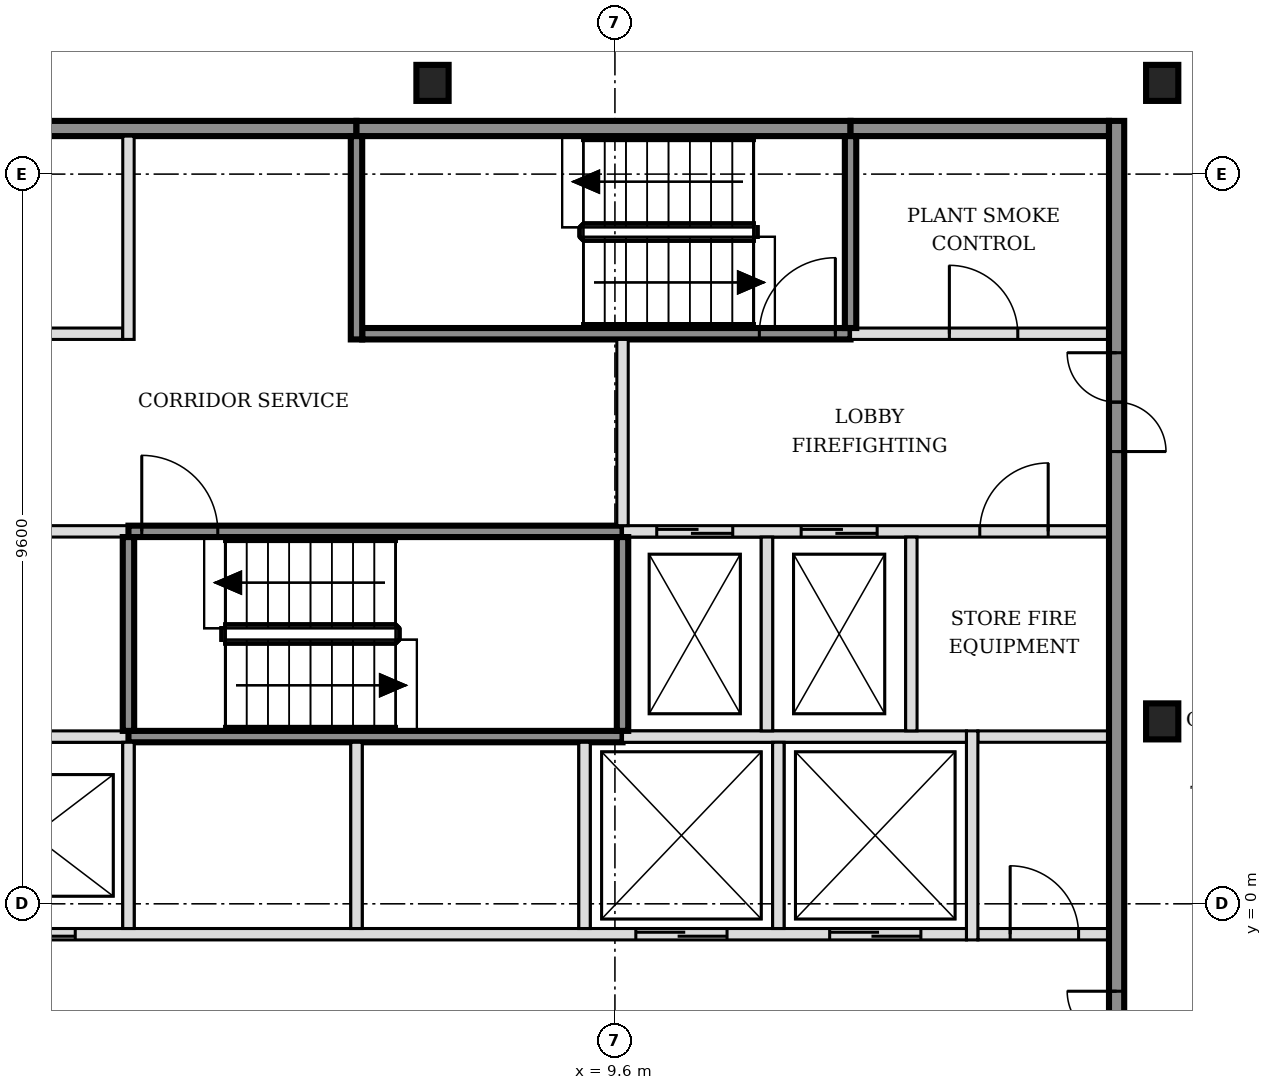
"""IFC4 building model, lengths in metres.
Left out: names, types, materials, properties, quantities, classifications, styles, units other than length and angle.
Written with IfcOpenShell. Run it as: python <this file> out.ifc"""

import sys

from ifc_helpers import new_model, si_unit, direction, frame, frame_2d, origin, origin_2d, place, context, subcontext, project, spatial, rectangle, i_section, extrude, element, fill, save


model = new_model("IFC4")
c1 = context("Model", 3, precision=1e-05, world=origin(), true_north=direction((0.0, 1.0)))
c2 = subcontext(c1, "Body", "Model", "MODEL_VIEW")
j1 = project(units=[si_unit("LENGTHUNIT", "METRE"), si_unit("PLANEANGLEUNIT", "RADIAN")], contexts=[c1])
p1 = place(None, origin())
s1 = spatial("IfcSite", under=j1, at=p1, CompositionType="ELEMENT")
p2 = place(p1, origin())
s2 = spatial("IfcBuilding", under=s1, at=p2, CompositionType="ELEMENT")
p3 = place(p2, frame((0.0, 0.0, 119.4)))
s3 = spatial("IfcBuildingStorey", under=s2, at=p3, CompositionType="ELEMENT", Elevation=119.4)
for number, where, z_axis, x_axis in (
    (1, (16.8, 2.4, -0.25), (0.0, 0.0, 1.0), (1.0, 0.0, 0.0)),
    (2, (7.2, 10.8, -0.25), (0.0, 0.0, 1.0), (1.0, 0.0, 0.0)),
    (3, (16.8, 10.8, -0.25), (0.0, 0.0, 1.0), (1.0, 0.0, 0.0)),
):
    element("IfcColumn", number, at=place(p3, frame(where, z_axis=z_axis, x_axis=x_axis)), inside=s3, PredefinedType="COLUMN", context=c2, shape_type="SweptSolid", body=[
        extrude(i_section(OverallWidth=0.424, OverallDepth=0.474, WebThickness=0.048, FlangeThickness=0.077, FilletRadius=0.015, at=origin_2d()), origin(), (0.0, 0.0, 1.0), 6.1),
    ])
p4 = place(p3, frame((-1.7, -0.4, 0.0), z_axis=(0.0, 0.0, 1.0), x_axis=(1.0, 0.0, 0.0)))
e4 = element("IfcWall", 4, at=p4, inside=s3, PredefinedType="SOLIDWALL", context=c2, shape_type="SweptSolid", body=[
    extrude(rectangle(XDim=15.925, YDim=0.15, at=frame_2d((7.962, 0.0))), origin(), (0.0, 0.0, 1.0), 5.85),
])
p5 = place(p4, frame((0.6, 0.0, 0.0)))
e5 = element("IfcOpeningElement", 5, at=p5, cuts=e4, PredefinedType="OPENING", context=c2, shape_type="SweptSolid", body=[
    extrude(rectangle(XDim=1.1, YDim=2.1, at=frame_2d((0.55, 1.05))), frame((0.0, 0.085, 0.0), z_axis=(0.0, -1.0, 0.0), x_axis=(1.0, 0.0, 0.0)), (0.0, 0.0, 1.0), 0.17),
])
p6 = place(p4, frame((3.1, 0.0, 0.0)))
e6 = element("IfcOpeningElement", 6, at=p6, cuts=e4, PredefinedType="OPENING", context=c2, shape_type="SweptSolid", body=[
    extrude(rectangle(XDim=1.1, YDim=2.1, at=frame_2d((0.55, 1.05))), frame((0.0, 0.085, 0.0), z_axis=(0.0, -1.0, 0.0), x_axis=(1.0, 0.0, 0.0)), (0.0, 0.0, 1.0), 0.17),
])
p7 = place(p4, frame((11.575, 0.0, 0.0)))
e7 = element("IfcOpeningElement", 7, at=p7, cuts=e4, PredefinedType="OPENING", context=c2, shape_type="SweptSolid", body=[
    extrude(rectangle(XDim=1.2, YDim=2.1, at=frame_2d((0.6, 1.05))), frame((0.0, 0.085, 0.0), z_axis=(0.0, -1.0, 0.0), x_axis=(1.0, 0.0, 0.0)), (0.0, 0.0, 1.0), 0.17),
])
p8 = place(p4, frame((14.125, 0.0, 0.0)))
e8 = element("IfcOpeningElement", 8, at=p8, cuts=e4, PredefinedType="OPENING", context=c2, shape_type="SweptSolid", body=[
    extrude(rectangle(XDim=1.2, YDim=2.1, at=frame_2d((0.6, 1.05))), frame((0.0, 0.085, 0.0), z_axis=(0.0, -1.0, 0.0), x_axis=(1.0, 0.0, 0.0)), (0.0, 0.0, 1.0), 0.17),
])
p9 = place(p3, frame((14.375, -0.4, 0.0), z_axis=(0.0, 0.0, 1.0), x_axis=(1.0, 0.0, 0.0)))
e9 = element("IfcWall", 9, at=p9, inside=s3, PredefinedType="PARTITIONING", context=c2, shape_type="SweptSolid", body=[
    extrude(rectangle(XDim=1.725, YDim=0.15, at=frame_2d((0.863, 0.0))), origin(), (0.0, 0.0, 1.0), 5.85),
])
p10 = place(p9, frame((0.425, 0.0, 0.0)))
e10 = element("IfcOpeningElement", 10, at=p10, cuts=e9, PredefinedType="OPENING", context=c2, shape_type="SweptSolid", body=[
    extrude(rectangle(XDim=0.9, YDim=2.1, at=frame_2d((0.45, 1.05))), frame((0.0, 0.085, 0.0), z_axis=(0.0, -1.0, 0.0), x_axis=(1.0, 0.0, 0.0)), (0.0, 0.0, 1.0), 0.17),
])
p11 = place(p3, frame((-1.7, 2.2, 0.0), z_axis=(0.0, 0.0, 1.0), x_axis=(1.0, 0.0, 0.0)))
e11 = element("IfcWall", 11, at=p11, inside=s3, PredefinedType="SOLIDWALL", context=c2, shape_type="SweptSolid", body=[
    extrude(rectangle(XDim=4.9, YDim=0.15, at=frame_2d((2.45, 0.0))), origin(), (0.0, 0.0, 1.0), 5.85),
])
p12 = place(p3, frame((3.2, 2.2, 0.0), z_axis=(0.0, 0.0, 1.0), x_axis=(1.0, 0.0, 0.0)))
e12 = element("IfcWall", 12, at=p12, inside=s3, PredefinedType="SOLIDWALL", context=c2, shape_type="SweptSolid", body=[
    extrude(rectangle(XDim=6.5, YDim=0.15, at=frame_2d((3.25, 0.0))), origin(), (0.0, 0.0, 1.0), 5.85),
])
p13 = place(p3, frame((9.7, 2.2, 0.0), z_axis=(0.0, 0.0, 1.0), x_axis=(1.0, 0.0, 0.0)))
e13 = element("IfcWall", 13, at=p13, inside=s3, PredefinedType="SOLIDWALL", context=c2, shape_type="SweptSolid", body=[
    extrude(rectangle(XDim=4.525, YDim=0.15, at=frame_2d((2.263, 0.0))), origin(), (0.0, 0.0, 1.0), 5.85),
])
p14 = place(p3, frame((14.375, 2.2, 0.0), z_axis=(0.0, 0.0, 1.0), x_axis=(1.0, 0.0, 0.0)))
e14 = element("IfcWall", 14, at=p14, inside=s3, PredefinedType="PARTITIONING", context=c2, shape_type="SweptSolid", body=[
    extrude(rectangle(XDim=1.725, YDim=0.15, at=frame_2d((0.863, 0.0))), origin(), (0.0, 0.0, 1.0), 5.85),
])
p15 = place(p3, frame((-1.7, 4.9, 0.0), z_axis=(0.0, 0.0, 1.0), x_axis=(1.0, 0.0, 0.0)))
e15 = element("IfcWall", 15, at=p15, inside=s3, PredefinedType="SOLIDWALL", context=c2, shape_type="SweptSolid", body=[
    extrude(rectangle(XDim=4.9, YDim=0.15, at=frame_2d((2.45, 0.0))), origin(), (0.0, 0.0, 1.0), 5.85),
])
p16 = place(p3, frame((3.2, 4.9, 0.0), z_axis=(0.0, 0.0, 1.0), x_axis=(1.0, 0.0, 0.0)))
e16 = element("IfcWall", 16, at=p16, inside=s3, PredefinedType="SOLIDWALL", context=c2, shape_type="SweptSolid", body=[
    extrude(rectangle(XDim=6.5, YDim=0.15, at=frame_2d((3.25, 0.0))), origin(), (0.0, 0.0, 1.0), 5.85),
])
p17 = place(p16, frame((0.175, 0.0, 0.0)))
e17 = element("IfcOpeningElement", 17, at=p17, cuts=e16, PredefinedType="OPENING", context=c2, shape_type="SweptSolid", body=[
    extrude(rectangle(XDim=1.0, YDim=2.1, at=frame_2d((0.5, 1.05))), frame((0.0, 0.085, 0.0), z_axis=(0.0, -1.0, 0.0), x_axis=(1.0, 0.0, 0.0)), (0.0, 0.0, 1.0), 0.17),
])
p18 = place(p3, frame((9.7, 4.9, 0.0), z_axis=(0.0, 0.0, 1.0), x_axis=(1.0, 0.0, 0.0)))
e18 = element("IfcWall", 18, at=p18, inside=s3, PredefinedType="SOLIDWALL", context=c2, shape_type="SweptSolid", body=[
    extrude(rectangle(XDim=6.4, YDim=0.15, at=frame_2d((3.2, 0.0))), origin(), (0.0, 0.0, 1.0), 5.85),
])
p19 = place(p18, frame((0.45, 0.0, 0.0)))
e19 = element("IfcOpeningElement", 19, at=p19, cuts=e18, PredefinedType="OPENING", context=c2, shape_type="SweptSolid", body=[
    extrude(rectangle(XDim=1.0, YDim=2.1, at=frame_2d((0.5, 1.05))), frame((0.0, 0.085, 0.0), z_axis=(0.0, -1.0, 0.0), x_axis=(1.0, 0.0, 0.0)), (0.0, 0.0, 1.0), 0.17),
])
p20 = place(p18, frame((2.35, 0.0, 0.0)))
e20 = element("IfcOpeningElement", 20, at=p20, cuts=e18, PredefinedType="OPENING", context=c2, shape_type="SweptSolid", body=[
    extrude(rectangle(XDim=1.0, YDim=2.1, at=frame_2d((0.5, 1.05))), frame((0.0, 0.085, 0.0), z_axis=(0.0, -1.0, 0.0), x_axis=(1.0, 0.0, 0.0)), (0.0, 0.0, 1.0), 0.17),
])
p21 = place(p18, frame((4.7, 0.0, 0.0)))
e21 = element("IfcOpeningElement", 21, at=p21, cuts=e18, PredefinedType="OPENING", context=c2, shape_type="SweptSolid", body=[
    extrude(rectangle(XDim=0.9, YDim=2.1, at=frame_2d((0.45, 1.05))), frame((0.0, 0.085, 0.0), z_axis=(0.0, -1.0, 0.0), x_axis=(1.0, 0.0, 0.0)), (0.0, 0.0, 1.0), 0.17),
])
p22 = place(p3, frame((-1.7, 7.5, 0.0), z_axis=(0.0, 0.0, 1.0), x_axis=(1.0, 0.0, 0.0)))
e22 = element("IfcWall", 22, at=p22, inside=s3, PredefinedType="SOLIDWALL", context=c2, shape_type="SweptSolid", body=[
    extrude(rectangle(XDim=4.825, YDim=0.15, at=frame_2d((2.413, 0.0))), origin(), (0.0, 0.0, 1.0), 5.85),
])
p23 = place(p3, frame((6.275, 7.5, 0.0), z_axis=(0.0, 0.0, 1.0), x_axis=(1.0, 0.0, 0.0)))
e23 = element("IfcWall", 23, at=p23, inside=s3, PredefinedType="SOLIDWALL", context=c2, shape_type="SweptSolid", body=[
    extrude(rectangle(XDim=6.425, YDim=0.15, at=frame_2d((3.212, 0.0))), origin(), (0.0, 0.0, 1.0), 5.85),
])
p24 = place(p23, frame((5.225, 0.0, 0.0)))
e24 = element("IfcOpeningElement", 24, at=p24, cuts=e23, PredefinedType="OPENING", context=c2, shape_type="SweptSolid", body=[
    extrude(rectangle(XDim=1.0, YDim=2.1, at=frame_2d((0.5, 1.05))), frame((0.0, 0.085, 0.0), z_axis=(0.0, -1.0, 0.0), x_axis=(1.0, 0.0, 0.0)), (0.0, 0.0, 1.0), 0.17),
])
p25 = place(p3, frame((12.7, 7.5, 0.0), z_axis=(0.0, 0.0, 1.0), x_axis=(1.0, 0.0, 0.0)))
e25 = element("IfcWall", 25, at=p25, inside=s3, PredefinedType="SOLIDWALL", context=c2, shape_type="SweptSolid", body=[
    extrude(rectangle(XDim=3.4, YDim=0.15, at=frame_2d((1.7, 0.0))), origin(), (0.0, 0.0, 1.0), 5.85),
])
p26 = place(p25, frame((1.3, 0.0, 0.0)))
e26 = element("IfcOpeningElement", 26, at=p26, cuts=e25, PredefinedType="OPENING", context=c2, shape_type="SweptSolid", body=[
    extrude(rectangle(XDim=0.9, YDim=2.1, at=frame_2d((0.45, 1.05))), frame((0.0, 0.085, 0.0), z_axis=(0.0, -1.0, 0.0), x_axis=(1.0, 0.0, 0.0)), (0.0, 0.0, 1.0), 0.17),
])
p27 = place(p3, frame((-1.7, 10.2, 0.0), z_axis=(0.0, 0.0, 1.0), x_axis=(1.0, 0.0, 0.0)))
e27 = element("IfcWall", 27, at=p27, inside=s3, PredefinedType="SOLIDWALL", context=c2, shape_type="SweptSolid", body=[
    extrude(rectangle(XDim=7.9, YDim=0.2, at=frame_2d((3.95, 0.0))), origin(), (0.0, 0.0, 1.0), 5.85),
])
p28 = place(p3, frame((6.2, 10.2, 0.0), z_axis=(0.0, 0.0, 1.0), x_axis=(1.0, 0.0, 0.0)))
e28 = element("IfcWall", 28, at=p28, inside=s3, PredefinedType="SOLIDWALL", context=c2, shape_type="SweptSolid", body=[
    extrude(rectangle(XDim=6.5, YDim=0.2, at=frame_2d((3.25, 0.0))), origin(), (0.0, 0.0, 1.0), 5.85),
])
p29 = place(p3, frame((12.7, 10.2, 0.0), z_axis=(0.0, 0.0, 1.0), x_axis=(1.0, 0.0, 0.0)))
e29 = element("IfcWall", 29, at=p29, inside=s3, PredefinedType="SOLIDWALL", context=c2, shape_type="SweptSolid", body=[
    extrude(rectangle(XDim=3.4, YDim=0.2, at=frame_2d((1.7, 0.0))), origin(), (0.0, 0.0, 1.0), 5.85),
])
p30 = place(p3, frame((3.2, -0.325, 0.0), z_axis=(0.0, 0.0, 1.0), x_axis=(0.0, 1.0, 0.0)))
e30 = element("IfcWall", 30, at=p30, inside=s3, PredefinedType="SOLIDWALL", context=c2, shape_type="SweptSolid", body=[
    extrude(rectangle(XDim=2.45, YDim=0.15, at=frame_2d((1.225, 0.0))), origin(), (0.0, 0.0, 1.0), 5.85),
])
p31 = place(p3, frame((3.2, 2.275, 0.0), z_axis=(0.0, 0.0, 1.0), x_axis=(0.0, 1.0, 0.0)))
e31 = element("IfcWall", 31, at=p31, inside=s3, PredefinedType="SOLIDWALL", context=c2, shape_type="SweptSolid", body=[
    extrude(rectangle(XDim=2.55, YDim=0.15, at=frame_2d((1.275, 0.0))), origin(), (0.0, 0.0, 1.0), 5.85),
])
p32 = place(p3, frame((3.2, 7.425, 0.0), z_axis=(0.0, 0.0, 1.0), x_axis=(0.0, 1.0, 0.0)))
e32 = element("IfcWall", 32, at=p32, inside=s3, PredefinedType="SOLIDWALL", context=c2, shape_type="SweptSolid", body=[
    extrude(rectangle(XDim=2.675, YDim=0.15, at=frame_2d((1.337, 0.0))), origin(), (0.0, 0.0, 1.0), 5.85),
])
p33 = place(p3, frame((6.2, -0.325, 0.0), z_axis=(0.0, 0.0, 1.0), x_axis=(0.0, 1.0, 0.0)))
e33 = element("IfcWall", 33, at=p33, inside=s3, PredefinedType="SOLIDWALL", context=c2, shape_type="SweptSolid", body=[
    extrude(rectangle(XDim=2.45, YDim=0.15, at=frame_2d((1.225, 0.0))), origin(), (0.0, 0.0, 1.0), 5.85),
])
p34 = place(p3, frame((6.2, 7.425, 0.0), z_axis=(0.0, 0.0, 1.0), x_axis=(0.0, 1.0, 0.0)))
e34 = element("IfcWall", 34, at=p34, inside=s3, PredefinedType="SOLIDWALL", context=c2, shape_type="SweptSolid", body=[
    extrude(rectangle(XDim=2.675, YDim=0.15, at=frame_2d((1.337, 0.0))), origin(), (0.0, 0.0, 1.0), 5.85),
])
p35 = place(p3, frame((9.2, -0.325, 0.0), z_axis=(0.0, 0.0, 1.0), x_axis=(0.0, 1.0, 0.0)))
e35 = element("IfcWall", 35, at=p35, inside=s3, PredefinedType="SOLIDWALL", context=c2, shape_type="SweptSolid", body=[
    extrude(rectangle(XDim=2.45, YDim=0.15, at=frame_2d((1.225, 0.0))), origin(), (0.0, 0.0, 1.0), 5.85),
])
p36 = place(p3, frame((9.7, 2.275, 0.0), z_axis=(0.0, 0.0, 1.0), x_axis=(0.0, 1.0, 0.0)))
e36 = element("IfcWall", 36, at=p36, inside=s3, PredefinedType="SOLIDWALL", context=c2, shape_type="SweptSolid", body=[
    extrude(rectangle(XDim=2.55, YDim=0.15, at=frame_2d((1.275, 0.0))), origin(), (0.0, 0.0, 1.0), 5.85),
])
p37 = place(p3, frame((9.7, 4.975, 0.0), z_axis=(0.0, 0.0, 1.0), x_axis=(0.0, 1.0, 0.0)))
e37 = element("IfcWall", 37, at=p37, inside=s3, PredefinedType="SOLIDWALL", context=c2, shape_type="SweptSolid", body=[
    extrude(rectangle(XDim=2.45, YDim=0.15, at=frame_2d((1.225, 0.0))), origin(), (0.0, 0.0, 1.0), 5.85),
])
p38 = place(p3, frame((11.6, 2.275, 0.0), z_axis=(0.0, 0.0, 1.0), x_axis=(0.0, 1.0, 0.0)))
e38 = element("IfcWall", 38, at=p38, inside=s3, PredefinedType="SOLIDWALL", context=c2, shape_type="SweptSolid", body=[
    extrude(rectangle(XDim=2.55, YDim=0.15, at=frame_2d((1.275, 0.0))), origin(), (0.0, 0.0, 1.0), 5.85),
])
p39 = place(p3, frame((11.75, -0.325, 0.0), z_axis=(0.0, 0.0, 1.0), x_axis=(0.0, 1.0, 0.0)))
e39 = element("IfcWall", 39, at=p39, inside=s3, PredefinedType="SOLIDWALL", context=c2, shape_type="SweptSolid", body=[
    extrude(rectangle(XDim=2.45, YDim=0.15, at=frame_2d((1.225, 0.0))), origin(), (0.0, 0.0, 1.0), 5.85),
])
p40 = place(p3, frame((12.7, 7.575, 0.0), z_axis=(0.0, 0.0, 1.0), x_axis=(0.0, 1.0, 0.0)))
e40 = element("IfcWall", 40, at=p40, inside=s3, PredefinedType="SOLIDWALL", context=c2, shape_type="SweptSolid", body=[
    extrude(rectangle(XDim=2.525, YDim=0.15, at=frame_2d((1.263, 0.0))), origin(), (0.0, 0.0, 1.0), 5.85),
])
p41 = place(p3, frame((13.5, 2.275, 0.0), z_axis=(0.0, 0.0, 1.0), x_axis=(0.0, 1.0, 0.0)))
e41 = element("IfcWall", 41, at=p41, inside=s3, PredefinedType="SOLIDWALL", context=c2, shape_type="SweptSolid", body=[
    extrude(rectangle(XDim=2.55, YDim=0.15, at=frame_2d((1.275, 0.0))), origin(), (0.0, 0.0, 1.0), 5.85),
])
p42 = place(p3, frame((14.3, -0.475, 0.0), z_axis=(0.0, 0.0, 1.0), x_axis=(0.0, 1.0, 0.0)))
e42 = element("IfcWall", 42, at=p42, inside=s3, PredefinedType="SOLIDWALL", context=c2, shape_type="SweptSolid", body=[
    extrude(rectangle(XDim=2.75, YDim=0.15, at=frame_2d((1.375, 0.0))), origin(), (0.0, 0.0, 1.0), 5.85),
])
p43 = place(p3, frame((16.2, -5.5, 0.0), z_axis=(0.0, 0.0, 1.0), x_axis=(0.0, 1.0, 0.0)))
e43 = element("IfcWall", 43, at=p43, inside=s3, PredefinedType="SOLIDWALL", context=c2, shape_type="SweptSolid", body=[
    extrude(rectangle(XDim=15.8, YDim=0.2, at=frame_2d((7.9, 0.0))), origin(), (0.0, 0.0, 1.0), 5.85),
])
p44 = place(p43, frame((3.05, 0.0, 0.0)))
e44 = element("IfcOpeningElement", 44, at=p44, cuts=e43, PredefinedType="OPENING", context=c2, shape_type="SweptSolid", body=[
    extrude(rectangle(XDim=1.3, YDim=2.1, at=frame_2d((0.65, 1.05))), frame((0.0, 0.11, 0.0), z_axis=(0.0, -1.0, 0.0), x_axis=(1.0, 0.0, 0.0)), (0.0, 0.0, 1.0), 0.22),
])
p45 = place(p43, frame((11.45, 0.0, 0.0)))
e45 = element("IfcOpeningElement", 45, at=p45, cuts=e43, PredefinedType="OPENING", context=c2, shape_type="SweptSolid", body=[
    extrude(rectangle(XDim=1.3, YDim=2.1, at=frame_2d((0.65, 1.05))), frame((0.0, 0.11, 0.0), z_axis=(0.0, -1.0, 0.0), x_axis=(1.0, 0.0, 0.0)), (0.0, 0.0, 1.0), 0.22),
])
p46 = place(p6, origin())
e46 = element("IfcDoor", 46, at=p46, inside=s3, OperationType="DOUBLE_DOOR_SLIDING", PredefinedType="DOOR", context=c2, shape_type="SweptSolid", body=[
    extrude(rectangle(XDim=1.1, YDim=2.1, at=frame_2d((0.55, 1.05))), frame((0.0, 0.025, 0.0), z_axis=(0.0, -1.0, 0.0), x_axis=(1.0, 0.0, 0.0)), (0.0, 0.0, 1.0), 0.05),
])
fill(e6, e46)
p47 = place(p7, origin())
e47 = element("IfcDoor", 47, at=p47, inside=s3, OperationType="DOUBLE_DOOR_SLIDING", PredefinedType="DOOR", context=c2, shape_type="SweptSolid", body=[
    extrude(rectangle(XDim=1.2, YDim=2.1, at=frame_2d((0.6, 1.05))), frame((0.0, 0.025, 0.0), z_axis=(0.0, -1.0, 0.0), x_axis=(1.0, 0.0, 0.0)), (0.0, 0.0, 1.0), 0.05),
])
fill(e7, e47)
p48 = place(p8, origin())
e48 = element("IfcDoor", 48, at=p48, inside=s3, OperationType="DOUBLE_DOOR_SLIDING", PredefinedType="DOOR", context=c2, shape_type="SweptSolid", body=[
    extrude(rectangle(XDim=1.2, YDim=2.1, at=frame_2d((0.6, 1.05))), frame((0.0, 0.025, 0.0), z_axis=(0.0, -1.0, 0.0), x_axis=(1.0, 0.0, 0.0)), (0.0, 0.0, 1.0), 0.05),
])
fill(e8, e48)
p49 = place(p19, origin())
e49 = element("IfcDoor", 49, at=p49, inside=s3, OperationType="DOUBLE_DOOR_SLIDING", PredefinedType="DOOR", context=c2, shape_type="SweptSolid", body=[
    extrude(rectangle(XDim=1.0, YDim=2.1, at=frame_2d((0.5, 1.05))), frame((0.0, 0.025, 0.0), z_axis=(0.0, -1.0, 0.0), x_axis=(1.0, 0.0, 0.0)), (0.0, 0.0, 1.0), 0.05),
])
fill(e19, e49)
p50 = place(p20, origin())
e50 = element("IfcDoor", 50, at=p50, inside=s3, OperationType="DOUBLE_DOOR_SLIDING", PredefinedType="DOOR", context=c2, shape_type="SweptSolid", body=[
    extrude(rectangle(XDim=1.0, YDim=2.1, at=frame_2d((0.5, 1.05))), frame((0.0, 0.025, 0.0), z_axis=(0.0, -1.0, 0.0), x_axis=(1.0, 0.0, 0.0)), (0.0, 0.0, 1.0), 0.05),
])
fill(e20, e50)
p51 = place(p17, origin())
e51 = element("IfcDoor", 51, at=p51, inside=s3, OperationType="SINGLE_SWING_LEFT", PredefinedType="DOOR", context=c2, shape_type="SweptSolid", body=[
    extrude(rectangle(XDim=1.0, YDim=2.1, at=frame_2d((0.5, 1.05))), frame((0.0, 0.025, 0.0), z_axis=(0.0, -1.0, 0.0), x_axis=(1.0, 0.0, 0.0)), (0.0, 0.0, 1.0), 0.05),
])
fill(e17, e51)
p52 = place(p24, origin())
e52 = element("IfcDoor", 52, at=p52, inside=s3, OperationType="SINGLE_SWING_RIGHT", PredefinedType="DOOR", context=c2, shape_type="SweptSolid", body=[
    extrude(rectangle(XDim=1.0, YDim=2.1, at=frame_2d((0.5, 1.05))), frame((0.0, 0.025, 0.0), z_axis=(0.0, -1.0, 0.0), x_axis=(1.0, 0.0, 0.0)), (0.0, 0.0, 1.0), 0.05),
])
fill(e24, e52)
p53 = place(p44, origin())
e53 = element("IfcDoor", 53, at=p53, inside=s3, OperationType="DOUBLE_DOOR_SINGLE_SWING", PredefinedType="DOOR", context=c2, shape_type="SweptSolid", body=[
    extrude(rectangle(XDim=1.3, YDim=2.1, at=frame_2d((0.65, 1.05))), frame((0.0, 0.025, 0.0), z_axis=(0.0, -1.0, 0.0), x_axis=(1.0, 0.0, 0.0)), (0.0, 0.0, 1.0), 0.05),
])
fill(e44, e53)
p54 = place(p45, origin())
e54 = element("IfcDoor", 54, at=p54, inside=s3, OperationType="DOUBLE_DOOR_SINGLE_SWING", PredefinedType="DOOR", context=c2, shape_type="SweptSolid", body=[
    extrude(rectangle(XDim=1.3, YDim=2.1, at=frame_2d((0.65, 1.05))), frame((0.0, 0.025, 0.0), z_axis=(0.0, -1.0, 0.0), x_axis=(1.0, 0.0, 0.0)), (0.0, 0.0, 1.0), 0.05),
])
fill(e45, e54)
p55 = place(p10, origin())
e55 = element("IfcDoor", 55, at=p55, inside=s3, OperationType="SINGLE_SWING_LEFT", PredefinedType="DOOR", context=c2, shape_type="SweptSolid", body=[
    extrude(rectangle(XDim=0.9, YDim=2.1, at=frame_2d((0.45, 1.05))), frame((0.0, 0.025, 0.0), z_axis=(0.0, -1.0, 0.0), x_axis=(1.0, 0.0, 0.0)), (0.0, 0.0, 1.0), 0.05),
])
fill(e10, e55)
p56 = place(p21, origin())
e56 = element("IfcDoor", 56, at=p56, inside=s3, OperationType="SINGLE_SWING_RIGHT", PredefinedType="DOOR", context=c2, shape_type="SweptSolid", body=[
    extrude(rectangle(XDim=0.9, YDim=2.1, at=frame_2d((0.45, 1.05))), frame((0.0, 0.025, 0.0), z_axis=(0.0, -1.0, 0.0), x_axis=(1.0, 0.0, 0.0)), (0.0, 0.0, 1.0), 0.05),
])
fill(e21, e56)
p57 = place(p26, origin())
e57 = element("IfcDoor", 57, at=p57, inside=s3, OperationType="SINGLE_SWING_LEFT", PredefinedType="DOOR", context=c2, shape_type="SweptSolid", body=[
    extrude(rectangle(XDim=0.9, YDim=2.1, at=frame_2d((0.45, 1.05))), frame((0.0, 0.025, 0.0), z_axis=(0.0, -1.0, 0.0), x_axis=(1.0, 0.0, 0.0)), (0.0, 0.0, 1.0), 0.05),
])
fill(e26, e57)
save(model, sys.argv[1])
